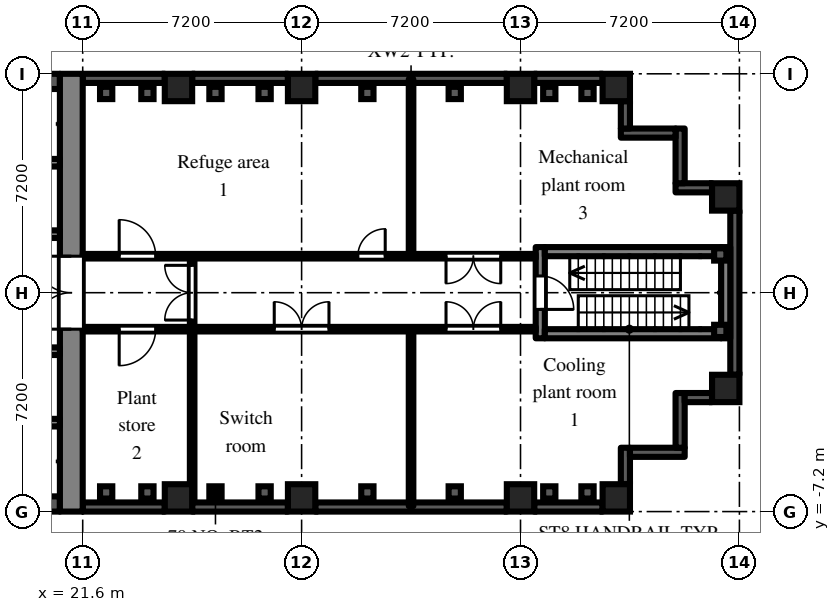
"""IFC4 building model, lengths in metres.
Left out: names, types, materials, properties, quantities, classifications, styles, units other than length and angle.
Written with IfcOpenShell. Run it as: python <this file> out.ifc"""

import sys

from ifc_helpers import new_model, si_unit, direction, frame, frame_2d, origin, origin_2d, place, context, subcontext, project, spatial, rectangle, extrude, element, fill, save


model = new_model("IFC4")
c1 = context("Model", 3, precision=1e-05, world=origin(), true_north=direction((0.0, 1.0)))
c2 = subcontext(c1, "Body", "Model", "MODEL_VIEW")
j1 = project(units=[si_unit("LENGTHUNIT", "METRE"), si_unit("PLANEANGLEUNIT", "RADIAN")], contexts=[c1])
p1 = place(None, origin())
s1 = spatial("IfcSite", under=j1, at=p1, CompositionType="ELEMENT")
p2 = place(p1, origin())
s2 = spatial("IfcBuilding", under=s1, at=p2, CompositionType="ELEMENT")
p3 = place(p2, frame((0.0, 0.0, 62.7)))
s3 = spatial("IfcBuildingStorey", under=s2, at=p3, CompositionType="ELEMENT", Elevation=62.7)
for number, where, z_axis, x_axis in (
    (1, (24.75, -6.75, 0.0), (0.0, 0.0, 1.0), (1.0, 0.0, 0.0)),
    (2, (24.75, 6.75, 0.0), (0.0, 0.0, 1.0), (1.0, 0.0, 0.0)),
    (3, (28.8, -6.75, 0.0), (0.0, 0.0, 1.0), (1.0, 0.0, 0.0)),
    (4, (28.8, 6.75, 0.0), (0.0, 0.0, 1.0), (1.0, 0.0, 0.0)),
    (5, (36.0, -6.75, 0.0), (0.0, 0.0, 1.0), (1.0, 0.0, 0.0)),
    (6, (36.0, 6.75, 0.0), (0.0, 0.0, 1.0), (1.0, 0.0, 0.0)),
    (7, (39.15, -6.75, 0.0), (0.0, 0.0, 1.0), (1.0, 0.0, 0.0)),
    (8, (39.15, 6.75, 0.0), (0.0, 0.0, 1.0), (1.0, 0.0, 0.0)),
    (9, (42.75, -3.15, 0.0), (0.0, 0.0, 1.0), (1.0, 0.0, 0.0)),
    (10, (42.75, 3.15, 0.0), (0.0, 0.0, 1.0), (1.0, 0.0, 0.0)),
):
    element("IfcColumn", number, at=place(p3, frame(where, z_axis=z_axis, x_axis=x_axis)), inside=s3, PredefinedType="COLUMN", context=c2, shape_type="SweptSolid", body=[
        extrude(rectangle(XDim=0.9, YDim=0.9, at=origin_2d()), origin(), (0.0, 0.0, 1.0), 4.2),
    ])
p4 = place(p3, frame((21.6, -7.05, 0.0), z_axis=(0.0, 0.0, 1.0), x_axis=(1.0, 0.0, 0.0)))
e11 = element("IfcWall", 11, at=p4, inside=s3, PredefinedType="SOLIDWALL", context=c2, shape_type="SweptSolid", body=[
    extrude(rectangle(XDim=2.7, YDim=0.3, at=frame_2d((1.35, 0.0))), origin(), (0.0, 0.0, 1.0), 3.3),
])
p5 = place(p3, frame((25.2, -7.05, 0.0), z_axis=(0.0, 0.0, 1.0), x_axis=(1.0, 0.0, 0.0)))
e12 = element("IfcWall", 12, at=p5, inside=s3, PredefinedType="SOLIDWALL", context=c2, shape_type="SweptSolid", body=[
    extrude(rectangle(XDim=3.15, YDim=0.3, at=frame_2d((1.575, 0.0))), origin(), (0.0, 0.0, 1.0), 3.3),
])
p6 = place(p3, frame((29.25, -7.05, 0.0), z_axis=(0.0, 0.0, 1.0), x_axis=(1.0, 0.0, 0.0)))
e13 = element("IfcWall", 13, at=p6, inside=s3, PredefinedType="SOLIDWALL", context=c2, shape_type="SweptSolid", body=[
    extrude(rectangle(XDim=6.3, YDim=0.3, at=frame_2d((3.15, 0.0))), origin(), (0.0, 0.0, 1.0), 3.3),
])
p7 = place(p3, frame((36.45, -7.05, 0.0), z_axis=(0.0, 0.0, 1.0), x_axis=(1.0, 0.0, 0.0)))
e14 = element("IfcWall", 14, at=p7, inside=s3, PredefinedType="SOLIDWALL", context=c2, shape_type="SweptSolid", body=[
    extrude(rectangle(XDim=2.25, YDim=0.3, at=frame_2d((1.125, 0.0))), origin(), (0.0, 0.0, 1.0), 3.3),
])
p8 = place(p3, frame((39.45, -6.3, 0.0), z_axis=(0.0, 0.0, 1.0), x_axis=(0.0, 1.0, 0.0)))
e15 = element("IfcWall", 15, at=p8, inside=s3, PredefinedType="SOLIDWALL", context=c2, shape_type="SweptSolid", body=[
    extrude(rectangle(XDim=1.2, YDim=0.3, at=frame_2d((0.6, 0.0))), origin(), (0.0, 0.0, 1.0), 3.775),
])
p9 = place(p3, frame((39.6, -5.25, 0.0), z_axis=(0.0, 0.0, 1.0), x_axis=(1.0, 0.0, 0.0)))
e16 = element("IfcWall", 16, at=p9, inside=s3, PredefinedType="SOLIDWALL", context=c2, shape_type="SweptSolid", body=[
    extrude(rectangle(XDim=1.8, YDim=0.3, at=frame_2d((0.9, 0.0))), origin(), (0.0, 0.0, 1.0), 3.775),
])
p10 = place(p3, frame((41.25, -5.1, 0.0), z_axis=(0.0, 0.0, 1.0), x_axis=(0.0, 1.0, 0.0)))
e17 = element("IfcWall", 17, at=p10, inside=s3, PredefinedType="SOLIDWALL", context=c2, shape_type="SweptSolid", body=[
    extrude(rectangle(XDim=1.8, YDim=0.3, at=frame_2d((0.9, 0.0))), origin(), (0.0, 0.0, 1.0), 3.775),
])
p11 = place(p3, frame((41.4, -3.45, 0.0), z_axis=(0.0, 0.0, 1.0), x_axis=(1.0, 0.0, 0.0)))
e18 = element("IfcWall", 18, at=p11, inside=s3, PredefinedType="SOLIDWALL", context=c2, shape_type="SweptSolid", body=[
    extrude(rectangle(XDim=0.9, YDim=0.3, at=frame_2d((0.45, 0.0))), origin(), (0.0, 0.0, 1.0), 3.775),
])
p12 = place(p3, frame((43.05, -2.7, 0.0), z_axis=(0.0, 0.0, 1.0), x_axis=(0.0, 1.0, 0.0)))
e19 = element("IfcWall", 19, at=p12, inside=s3, PredefinedType="SOLIDWALL", context=c2, shape_type="SweptSolid", body=[
    extrude(rectangle(XDim=5.4, YDim=0.3, at=frame_2d((2.7, 0.0))), origin(), (0.0, 0.0, 1.0), 3.3),
])
p13 = place(p3, frame((42.3, 3.45, 0.0), z_axis=(0.0, 0.0, 1.0), x_axis=(-1.0, 0.0, 0.0)))
e20 = element("IfcWall", 20, at=p13, inside=s3, PredefinedType="SOLIDWALL", context=c2, shape_type="SweptSolid", body=[
    extrude(rectangle(XDim=1.2, YDim=0.3, at=frame_2d((0.6, 0.0))), origin(), (0.0, 0.0, 1.0), 3.775),
])
p14 = place(p3, frame((41.25, 3.6, 0.0), z_axis=(0.0, 0.0, 1.0), x_axis=(0.0, 1.0, 0.0)))
e21 = element("IfcWall", 21, at=p14, inside=s3, PredefinedType="SOLIDWALL", context=c2, shape_type="SweptSolid", body=[
    extrude(rectangle(XDim=1.8, YDim=0.3, at=frame_2d((0.9, 0.0))), origin(), (0.0, 0.0, 1.0), 3.775),
])
p15 = place(p3, frame((41.1, 5.25, 0.0), z_axis=(0.0, 0.0, 1.0), x_axis=(-1.0, 0.0, 0.0)))
e22 = element("IfcWall", 22, at=p15, inside=s3, PredefinedType="SOLIDWALL", context=c2, shape_type="SweptSolid", body=[
    extrude(rectangle(XDim=1.8, YDim=0.3, at=frame_2d((0.9, 0.0))), origin(), (0.0, 0.0, 1.0), 3.775),
])
p16 = place(p3, frame((39.45, 5.4, 0.0), z_axis=(0.0, 0.0, 1.0), x_axis=(0.0, 1.0, 0.0)))
e23 = element("IfcWall", 23, at=p16, inside=s3, PredefinedType="SOLIDWALL", context=c2, shape_type="SweptSolid", body=[
    extrude(rectangle(XDim=0.9, YDim=0.3, at=frame_2d((0.45, 0.0))), origin(), (0.0, 0.0, 1.0), 3.775),
])
p17 = place(p3, frame((38.7, 7.05, 0.0), z_axis=(0.0, 0.0, 1.0), x_axis=(-1.0, 0.0, 0.0)))
e24 = element("IfcWall", 24, at=p17, inside=s3, PredefinedType="SOLIDWALL", context=c2, shape_type="SweptSolid", body=[
    extrude(rectangle(XDim=2.25, YDim=0.3, at=frame_2d((1.125, 0.0))), origin(), (0.0, 0.0, 1.0), 3.3),
])
p18 = place(p3, frame((35.55, 7.05, 0.0), z_axis=(0.0, 0.0, 1.0), x_axis=(-1.0, 0.0, 0.0)))
e25 = element("IfcWall", 25, at=p18, inside=s3, PredefinedType="SOLIDWALL", context=c2, shape_type="SweptSolid", body=[
    extrude(rectangle(XDim=6.3, YDim=0.3, at=frame_2d((3.15, 0.0))), origin(), (0.0, 0.0, 1.0), 3.3),
])
p19 = place(p3, frame((28.35, 7.05, 0.0), z_axis=(0.0, 0.0, 1.0), x_axis=(-1.0, 0.0, 0.0)))
e26 = element("IfcWall", 26, at=p19, inside=s3, PredefinedType="SOLIDWALL", context=c2, shape_type="SweptSolid", body=[
    extrude(rectangle(XDim=3.15, YDim=0.3, at=frame_2d((1.575, 0.0))), origin(), (0.0, 0.0, 1.0), 3.3),
])
p20 = place(p3, frame((24.3, 7.05, 0.0), z_axis=(0.0, 0.0, 1.0), x_axis=(-1.0, 0.0, 0.0)))
e27 = element("IfcWall", 27, at=p20, inside=s3, PredefinedType="SOLIDWALL", context=c2, shape_type="SweptSolid", body=[
    extrude(rectangle(XDim=2.7, YDim=0.3, at=frame_2d((1.35, 0.0))), origin(), (0.0, 0.0, 1.0), 3.3),
])
p21 = place(p3, frame((21.225, -7.2, 0.0), z_axis=(0.0, 0.0, 1.0), x_axis=(0.0, 1.0, 0.0)))
e28 = element("IfcWall", 28, at=p21, inside=s3, PredefinedType="SHEAR", context=c2, shape_type="SweptSolid", body=[
    extrude(rectangle(XDim=14.4, YDim=0.75, at=frame_2d((7.2, 0.0))), origin(), (0.0, 0.0, 1.0), 3.775),
])
p22 = place(p21, frame((6.0, 0.0, 0.0)))
e29 = element("IfcOpeningElement", 29, at=p22, cuts=e28, PredefinedType="OPENING", context=c2, shape_type="SweptSolid", body=[
    extrude(rectangle(XDim=2.4, YDim=2.2, at=frame_2d((1.2, 1.1))), frame((0.0, 0.385, 0.0), z_axis=(0.0, -1.0, 0.0), x_axis=(1.0, 0.0, 0.0)), (0.0, 0.0, 1.0), 0.77),
])
p23 = place(p3, frame((7.9, 6.95, 0.0), z_axis=(0.0, 0.0, 1.0), x_axis=(1.0, 0.0, 0.0)))
e30 = element("IfcWall", 30, at=p23, inside=s3, PredefinedType="SHEAR", context=c2, shape_type="SweptSolid", body=[
    extrude(rectangle(XDim=12.95, YDim=0.5, at=frame_2d((6.475, 0.0))), origin(), (0.0, 0.0, 1.0), 3.775),
])
p24 = place(p3, frame((7.9, 1.925, 0.0), z_axis=(0.0, 0.0, 1.0), x_axis=(1.0, 0.0, 0.0)))
e31 = element("IfcWall", 31, at=p24, inside=s3, PredefinedType="SHEAR", context=c2, shape_type="SweptSolid", body=[
    extrude(rectangle(XDim=12.95, YDim=0.25, at=frame_2d((6.475, 0.0))), origin(), (0.0, 0.0, 1.0), 3.775),
])
p25 = place(p24, frame((0.525, 0.0, 0.0)))
e32 = element("IfcOpeningElement", 32, at=p25, cuts=e31, PredefinedType="OPENING", context=c2, shape_type="SweptSolid", body=[
    extrude(rectangle(XDim=0.9, YDim=2.1, at=frame_2d((0.45, 1.05))), frame((0.0, 0.135, 0.0), z_axis=(0.0, -1.0, 0.0), x_axis=(1.0, 0.0, 0.0)), (0.0, 0.0, 1.0), 0.27),
])
p26 = place(p24, frame((2.625, 0.0, 0.0)))
e33 = element("IfcOpeningElement", 33, at=p26, cuts=e31, PredefinedType="OPENING", context=c2, shape_type="SweptSolid", body=[
    extrude(rectangle(XDim=1.1, YDim=2.1, at=frame_2d((0.55, 1.05))), frame((0.0, 0.135, 0.0), z_axis=(0.0, -1.0, 0.0), x_axis=(1.0, 0.0, 0.0)), (0.0, 0.0, 1.0), 0.27),
])
p27 = place(p24, frame((4.925, 0.0, 0.0)))
e34 = element("IfcOpeningElement", 34, at=p27, cuts=e31, PredefinedType="OPENING", context=c2, shape_type="SweptSolid", body=[
    extrude(rectangle(XDim=0.9, YDim=2.1, at=frame_2d((0.45, 1.05))), frame((0.0, 0.135, 0.0), z_axis=(0.0, -1.0, 0.0), x_axis=(1.0, 0.0, 0.0)), (0.0, 0.0, 1.0), 0.27),
])
p28 = place(p24, frame((8.225, 0.0, 0.0)))
e35 = element("IfcOpeningElement", 35, at=p28, cuts=e31, PredefinedType="OPENING", context=c2, shape_type="SweptSolid", body=[
    extrude(rectangle(XDim=0.9, YDim=2.1, at=frame_2d((0.45, 1.05))), frame((0.0, 0.135, 0.0), z_axis=(0.0, -1.0, 0.0), x_axis=(1.0, 0.0, 0.0)), (0.0, 0.0, 1.0), 0.27),
])
p29 = place(p3, frame((12.3, 4.275, 0.0), z_axis=(0.0, 0.0, 1.0), x_axis=(1.0, 0.0, 0.0)))
e36 = element("IfcWall", 36, at=p29, inside=s3, PredefinedType="SHEAR", context=c2, shape_type="SweptSolid", body=[
    extrude(rectangle(XDim=8.55, YDim=0.25, at=frame_2d((4.275, 0.0))), origin(), (0.0, 0.0, 1.0), 3.775),
])
p30 = place(p3, frame((7.9, -6.95, 0.0), z_axis=(0.0, 0.0, 1.0), x_axis=(1.0, 0.0, 0.0)))
e37 = element("IfcWall", 37, at=p30, inside=s3, PredefinedType="SHEAR", context=c2, shape_type="SweptSolid", body=[
    extrude(rectangle(XDim=12.95, YDim=0.5, at=frame_2d((6.475, 0.0))), origin(), (0.0, 0.0, 1.0), 3.775),
])
p31 = place(p3, frame((7.9, -1.925, 0.0), z_axis=(0.0, 0.0, 1.0), x_axis=(1.0, 0.0, 0.0)))
e38 = element("IfcWall", 38, at=p31, inside=s3, PredefinedType="SHEAR", context=c2, shape_type="SweptSolid", body=[
    extrude(rectangle(XDim=12.95, YDim=0.25, at=frame_2d((6.475, 0.0))), origin(), (0.0, 0.0, 1.0), 3.775),
])
p32 = place(p31, frame((4.825, 0.0, 0.0)))
e39 = element("IfcOpeningElement", 39, at=p32, cuts=e38, PredefinedType="OPENING", context=c2, shape_type="SweptSolid", body=[
    extrude(rectangle(XDim=1.1, YDim=2.1, at=frame_2d((0.55, 1.05))), frame((0.0, 0.135, 0.0), z_axis=(0.0, -1.0, 0.0), x_axis=(1.0, 0.0, 0.0)), (0.0, 0.0, 1.0), 0.27),
])
p33 = place(p31, frame((7.025, 0.0, 0.0)))
e40 = element("IfcOpeningElement", 40, at=p33, cuts=e38, PredefinedType="OPENING", context=c2, shape_type="SweptSolid", body=[
    extrude(rectangle(XDim=1.1, YDim=2.1, at=frame_2d((0.55, 1.05))), frame((0.0, 0.135, 0.0), z_axis=(0.0, -1.0, 0.0), x_axis=(1.0, 0.0, 0.0)), (0.0, 0.0, 1.0), 0.27),
])
p34 = place(p31, frame((9.225, 0.0, 0.0)))
e41 = element("IfcOpeningElement", 41, at=p34, cuts=e38, PredefinedType="OPENING", context=c2, shape_type="SweptSolid", body=[
    extrude(rectangle(XDim=1.1, YDim=2.1, at=frame_2d((0.55, 1.05))), frame((0.0, 0.135, 0.0), z_axis=(0.0, -1.0, 0.0), x_axis=(1.0, 0.0, 0.0)), (0.0, 0.0, 1.0), 0.27),
])
p35 = place(p31, frame((0.525, 0.0, 0.0)))
e42 = element("IfcOpeningElement", 42, at=p35, cuts=e38, PredefinedType="OPENING", context=c2, shape_type="SweptSolid", body=[
    extrude(rectangle(XDim=0.9, YDim=2.1, at=frame_2d((0.45, 1.05))), frame((0.0, 0.135, 0.0), z_axis=(0.0, -1.0, 0.0), x_axis=(1.0, 0.0, 0.0)), (0.0, 0.0, 1.0), 0.27),
])
p36 = place(p31, frame((2.625, 0.0, 0.0)))
e43 = element("IfcOpeningElement", 43, at=p36, cuts=e38, PredefinedType="OPENING", context=c2, shape_type="SweptSolid", body=[
    extrude(rectangle(XDim=1.1, YDim=2.1, at=frame_2d((0.55, 1.05))), frame((0.0, 0.135, 0.0), z_axis=(0.0, -1.0, 0.0), x_axis=(1.0, 0.0, 0.0)), (0.0, 0.0, 1.0), 0.27),
])
p37 = place(p3, frame((12.3, -4.275, 0.0), z_axis=(0.0, 0.0, 1.0), x_axis=(1.0, 0.0, 0.0)))
e44 = element("IfcWall", 44, at=p37, inside=s3, PredefinedType="SHEAR", context=c2, shape_type="SweptSolid", body=[
    extrude(rectangle(XDim=8.55, YDim=0.25, at=frame_2d((4.275, 0.0))), origin(), (0.0, 0.0, 1.0), 3.775),
])
p38 = place(p3, frame((36.65, -1.5, 0.0), z_axis=(0.0, 0.0, 1.0), x_axis=(0.0, 1.0, 0.0)))
e45 = element("IfcWall", 45, at=p38, inside=s3, PredefinedType="SHEAR", context=c2, shape_type="SweptSolid", body=[
    extrude(rectangle(XDim=3.0, YDim=0.3, at=frame_2d((1.5, 0.0))), origin(), (0.0, 0.0, 1.0), 3.775),
])
p39 = place(p38, frame((0.95, 0.0, 0.0)))
e46 = element("IfcOpeningElement", 46, at=p39, cuts=e45, PredefinedType="OPENING", context=c2, shape_type="SweptSolid", body=[
    extrude(rectangle(XDim=1.1, YDim=2.1, at=frame_2d((0.55, 1.05))), frame((0.0, 0.16, 0.0), z_axis=(0.0, -1.0, 0.0), x_axis=(1.0, 0.0, 0.0)), (0.0, 0.0, 1.0), 0.32),
])
p40 = place(p3, frame((42.75, -1.5, 0.0), z_axis=(0.0, 0.0, 1.0), x_axis=(0.0, 1.0, 0.0)))
e47 = element("IfcWall", 47, at=p40, inside=s3, PredefinedType="SHEAR", context=c2, shape_type="SweptSolid", body=[
    extrude(rectangle(XDim=3.0, YDim=0.3, at=frame_2d((1.5, 0.0))), origin(), (0.0, 0.0, 1.0), 3.775),
])
for number, where, z_axis, x_axis in (
    (48, (36.8, -1.35, 0.0), (0.0, 0.0, 1.0), (1.0, 0.0, 0.0)),
    (49, (36.8, 1.35, 0.0), (0.0, 0.0, 1.0), (1.0, 0.0, 0.0)),
):
    element("IfcWall", number, at=place(p3, frame(where, z_axis=z_axis, x_axis=x_axis)), inside=s3, PredefinedType="SHEAR", context=c2, shape_type="SweptSolid", body=[
        extrude(rectangle(XDim=5.8, YDim=0.3, at=frame_2d((2.9, 0.0))), origin(), (0.0, 0.0, 1.0), 3.775),
    ])
p41 = place(p3, frame((21.6, -1.2, 0.0), z_axis=(0.0, 0.0, 1.0), x_axis=(1.0, 0.0, 0.0)))
e50 = element("IfcWall", 50, at=p41, inside=s3, PredefinedType="PARTITIONING", context=c2, shape_type="SweptSolid", body=[
    extrude(rectangle(XDim=14.9, YDim=0.15, at=frame_2d((7.45, 0.0))), origin(), (0.0, 0.0, 1.0), 3.775),
])
p42 = place(p41, frame((1.2, 0.0, 0.0)))
e51 = element("IfcOpeningElement", 51, at=p42, cuts=e50, PredefinedType="OPENING", context=c2, shape_type="SweptSolid", body=[
    extrude(rectangle(XDim=1.2, YDim=2.1, at=frame_2d((0.6, 1.05))), frame((0.0, 0.085, 0.0), z_axis=(0.0, -1.0, 0.0), x_axis=(1.0, 0.0, 0.0)), (0.0, 0.0, 1.0), 0.17),
])
p43 = place(p41, frame((6.3, 0.0, 0.0)))
e52 = element("IfcOpeningElement", 52, at=p43, cuts=e50, PredefinedType="OPENING", context=c2, shape_type="SweptSolid", body=[
    extrude(rectangle(XDim=1.8, YDim=2.1, at=frame_2d((0.9, 1.05))), frame((0.0, 0.085, 0.0), z_axis=(0.0, -1.0, 0.0), x_axis=(1.0, 0.0, 0.0)), (0.0, 0.0, 1.0), 0.17),
])
p44 = place(p41, frame((11.95, 0.0, 0.0)))
e53 = element("IfcOpeningElement", 53, at=p44, cuts=e50, PredefinedType="OPENING", context=c2, shape_type="SweptSolid", body=[
    extrude(rectangle(XDim=1.8, YDim=2.1, at=frame_2d((0.9, 1.05))), frame((0.0, 0.085, 0.0), z_axis=(0.0, -1.0, 0.0), x_axis=(1.0, 0.0, 0.0)), (0.0, 0.0, 1.0), 0.17),
])
p45 = place(p3, frame((21.6, 1.2, 0.0), z_axis=(0.0, 0.0, 1.0), x_axis=(1.0, 0.0, 0.0)))
e54 = element("IfcWall", 54, at=p45, inside=s3, PredefinedType="PARTITIONING", context=c2, shape_type="SweptSolid", body=[
    extrude(rectangle(XDim=14.9, YDim=0.15, at=frame_2d((7.45, 0.0))), origin(), (0.0, 0.0, 1.0), 3.775),
])
p46 = place(p45, frame((1.2, 0.0, 0.0)))
e55 = element("IfcOpeningElement", 55, at=p46, cuts=e54, PredefinedType="OPENING", context=c2, shape_type="SweptSolid", body=[
    extrude(rectangle(XDim=1.2, YDim=2.1, at=frame_2d((0.6, 1.05))), frame((0.0, 0.085, 0.0), z_axis=(0.0, -1.0, 0.0), x_axis=(1.0, 0.0, 0.0)), (0.0, 0.0, 1.0), 0.17),
])
p47 = place(p45, frame((9.05, 0.0, 0.0)))
e56 = element("IfcOpeningElement", 56, at=p47, cuts=e54, PredefinedType="OPENING", context=c2, shape_type="SweptSolid", body=[
    extrude(rectangle(XDim=0.9, YDim=2.1, at=frame_2d((0.45, 1.05))), frame((0.0, 0.085, 0.0), z_axis=(0.0, -1.0, 0.0), x_axis=(1.0, 0.0, 0.0)), (0.0, 0.0, 1.0), 0.17),
])
p48 = place(p45, frame((11.95, 0.0, 0.0)))
e57 = element("IfcOpeningElement", 57, at=p48, cuts=e54, PredefinedType="OPENING", context=c2, shape_type="SweptSolid", body=[
    extrude(rectangle(XDim=1.8, YDim=2.1, at=frame_2d((0.9, 1.05))), frame((0.0, 0.085, 0.0), z_axis=(0.0, -1.0, 0.0), x_axis=(1.0, 0.0, 0.0)), (0.0, 0.0, 1.0), 0.17),
])
p49 = place(p3, frame((25.2, -6.9, 0.0), z_axis=(0.0, 0.0, 1.0), x_axis=(0.0, 1.0, 0.0)))
e58 = element("IfcWall", 58, at=p49, inside=s3, PredefinedType="PARTITIONING", context=c2, shape_type="SweptSolid", body=[
    extrude(rectangle(XDim=8.025, YDim=0.15, at=frame_2d((4.012, 0.0))), origin(), (0.0, 0.0, 1.0), 3.775),
])
p50 = place(p49, frame((6.0, 0.0, 0.0)))
e59 = element("IfcOpeningElement", 59, at=p50, cuts=e58, PredefinedType="OPENING", context=c2, shape_type="SweptSolid", body=[
    extrude(rectangle(XDim=1.8, YDim=2.1, at=frame_2d((0.9, 1.05))), frame((0.0, 0.085, 0.0), z_axis=(0.0, -1.0, 0.0), x_axis=(1.0, 0.0, 0.0)), (0.0, 0.0, 1.0), 0.17),
])
for number, where, z_axis, x_axis in (
    (60, (32.4, -7.02, 0.0), (0.0, 0.0, 1.0), (0.0, 1.0, 0.0)),
    (61, (32.4, 1.275, 0.0), (0.0, 0.0, 1.0), (0.0, 1.0, 0.0)),
):
    element("IfcWall", number, at=place(p3, frame(where, z_axis=z_axis, x_axis=x_axis)), inside=s3, PredefinedType="PARTITIONING", context=c2, shape_type="SweptSolid", body=[
        extrude(rectangle(XDim=5.745, YDim=0.15, at=frame_2d((2.873, 0.0))), origin(), (0.0, 0.0, 1.0), 3.775),
    ])
p51 = place(p22, origin())
e62 = element("IfcDoor", 62, at=p51, inside=s3, OperationType="DOUBLE_DOOR_DOUBLE_SWING", PredefinedType="DOOR", context=c2, shape_type="SweptSolid", body=[
    extrude(rectangle(XDim=2.4, YDim=2.2, at=frame_2d((1.2, 1.1))), frame((0.0, 0.025, 0.0), z_axis=(0.0, -1.0, 0.0), x_axis=(1.0, 0.0, 0.0)), (0.0, 0.0, 1.0), 0.05),
])
fill(e29, e62)
p52 = place(p39, frame((1.1, 0.0, 0.0), z_axis=(0.0, 0.0, 1.0), x_axis=(-1.0, 0.0, 0.0)))
e63 = element("IfcDoor", 63, at=p52, inside=s3, OperationType="SINGLE_SWING_RIGHT", PredefinedType="DOOR", context=c2, shape_type="SweptSolid", body=[
    extrude(rectangle(XDim=1.1, YDim=2.1, at=frame_2d((0.55, 1.05))), frame((0.0, 0.025, 0.0), z_axis=(0.0, -1.0, 0.0), x_axis=(1.0, 0.0, 0.0)), (0.0, 0.0, 1.0), 0.05),
])
fill(e46, e63)
p53 = place(p50, origin())
e64 = element("IfcDoor", 64, at=p53, inside=s3, OperationType="DOUBLE_DOOR_DOUBLE_SWING", PredefinedType="DOOR", context=c2, shape_type="SweptSolid", body=[
    extrude(rectangle(XDim=1.8, YDim=2.1, at=frame_2d((0.9, 1.05))), frame((0.0, 0.025, 0.0), z_axis=(0.0, -1.0, 0.0), x_axis=(1.0, 0.0, 0.0)), (0.0, 0.0, 1.0), 0.05),
])
fill(e59, e64)
p54 = place(p46, origin())
e65 = element("IfcDoor", 65, at=p54, inside=s3, OperationType="SINGLE_SWING_LEFT", PredefinedType="DOOR", context=c2, shape_type="SweptSolid", body=[
    extrude(rectangle(XDim=1.2, YDim=2.1, at=frame_2d((0.6, 1.05))), frame((0.0, 0.025, 0.0), z_axis=(0.0, -1.0, 0.0), x_axis=(1.0, 0.0, 0.0)), (0.0, 0.0, 1.0), 0.05),
])
fill(e55, e65)
p55 = place(p47, origin())
e66 = element("IfcDoor", 66, at=p55, inside=s3, OperationType="SINGLE_SWING_RIGHT", PredefinedType="DOOR", context=c2, shape_type="SweptSolid", body=[
    extrude(rectangle(XDim=0.9, YDim=2.1, at=frame_2d((0.45, 1.05))), frame((0.0, 0.025, 0.0), z_axis=(0.0, -1.0, 0.0), x_axis=(1.0, 0.0, 0.0)), (0.0, 0.0, 1.0), 0.05),
])
fill(e56, e66)
p56 = place(p48, frame((1.8, 0.0, 0.0), z_axis=(0.0, 0.0, 1.0), x_axis=(-1.0, 0.0, 0.0)))
e67 = element("IfcDoor", 67, at=p56, inside=s3, OperationType="DOUBLE_DOOR_DOUBLE_SWING", PredefinedType="DOOR", context=c2, shape_type="SweptSolid", body=[
    extrude(rectangle(XDim=1.8, YDim=2.1, at=frame_2d((0.9, 1.05))), frame((0.0, 0.025, 0.0), z_axis=(0.0, -1.0, 0.0), x_axis=(1.0, 0.0, 0.0)), (0.0, 0.0, 1.0), 0.05),
])
fill(e57, e67)
p57 = place(p42, frame((1.2, 0.0, 0.0), z_axis=(0.0, 0.0, 1.0), x_axis=(-1.0, 0.0, 0.0)))
e68 = element("IfcDoor", 68, at=p57, inside=s3, OperationType="SINGLE_SWING_RIGHT", PredefinedType="DOOR", context=c2, shape_type="SweptSolid", body=[
    extrude(rectangle(XDim=1.2, YDim=2.1, at=frame_2d((0.6, 1.05))), frame((0.0, 0.025, 0.0), z_axis=(0.0, -1.0, 0.0), x_axis=(1.0, 0.0, 0.0)), (0.0, 0.0, 1.0), 0.05),
])
fill(e51, e68)
p58 = place(p43, origin())
e69 = element("IfcDoor", 69, at=p58, inside=s3, OperationType="DOUBLE_DOOR_DOUBLE_SWING", PredefinedType="DOOR", context=c2, shape_type="SweptSolid", body=[
    extrude(rectangle(XDim=1.8, YDim=2.1, at=frame_2d((0.9, 1.05))), frame((0.0, 0.025, 0.0), z_axis=(0.0, -1.0, 0.0), x_axis=(1.0, 0.0, 0.0)), (0.0, 0.0, 1.0), 0.05),
])
fill(e52, e69)
p59 = place(p44, origin())
e70 = element("IfcDoor", 70, at=p59, inside=s3, OperationType="DOUBLE_DOOR_DOUBLE_SWING", PredefinedType="DOOR", context=c2, shape_type="SweptSolid", body=[
    extrude(rectangle(XDim=1.8, YDim=2.1, at=frame_2d((0.9, 1.05))), frame((0.0, 0.025, 0.0), z_axis=(0.0, -1.0, 0.0), x_axis=(1.0, 0.0, 0.0)), (0.0, 0.0, 1.0), 0.05),
])
fill(e53, e70)
save(model, sys.argv[1])
